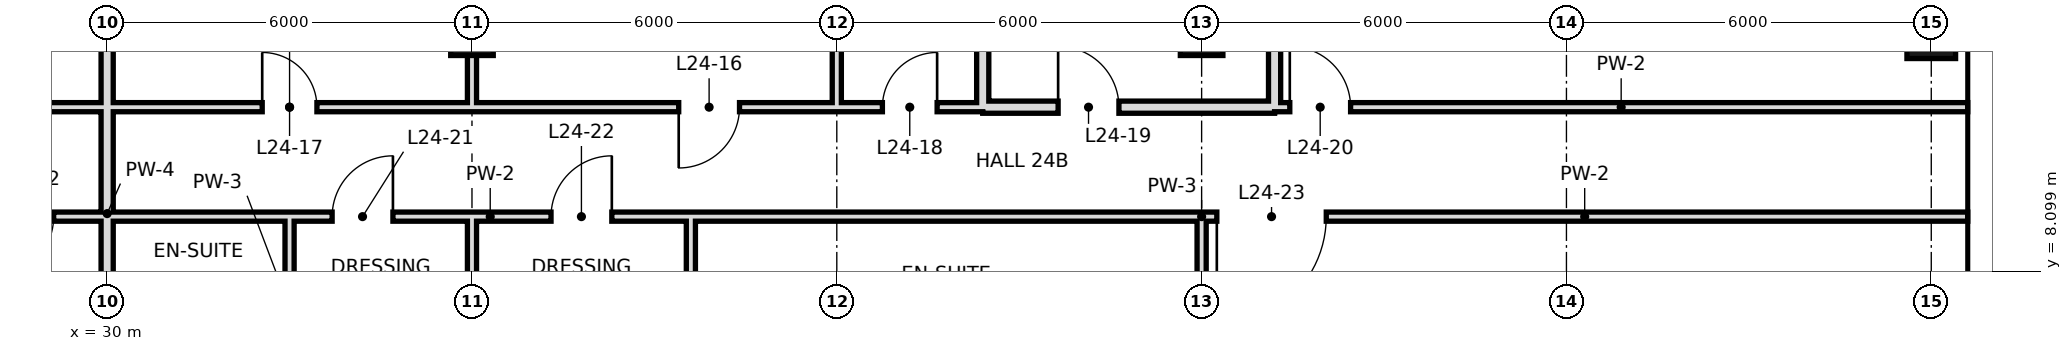
"""IFC4 building model, lengths in metres.
Left out: names, types, materials, properties, quantities, classifications, styles, units other than length and angle.
Written with IfcOpenShell. Run it as: python <this file> out.ifc"""

import sys

from ifc_helpers import new_model, si_unit, direction, frame, frame_2d, origin, origin_2d, place, context, subcontext, project, spatial, rectangle, hollow_rectangle, extrude, element, fill, save


model = new_model("IFC4")
c1 = context("Model", 3, precision=1e-05, world=origin(), true_north=direction((0.0, 1.0)))
c2 = subcontext(c1, "Body", "Model", "MODEL_VIEW")
j1 = project(units=[si_unit("LENGTHUNIT", "METRE"), si_unit("PLANEANGLEUNIT", "RADIAN")], contexts=[c1])
p1 = place(None, origin())
s1 = spatial("IfcSite", under=j1, at=p1, CompositionType="ELEMENT")
p2 = place(p1, origin())
s2 = spatial("IfcBuilding", under=s1, at=p2, CompositionType="ELEMENT")
p3 = place(p2, frame((0.0, 0.0, 110.6)))
s3 = spatial("IfcBuildingStorey", under=s2, at=p3, CompositionType="ELEMENT", Elevation=110.6)
for number, where, z_axis, x_axis in (
    (1, (36.0, 12.0, 0.0), (0.0, 0.0, 1.0), (1.0, 0.0, 0.0)),
    (2, (48.0, 12.0, 0.0), (0.0, 0.0, 1.0), (1.0, 0.0, 0.0)),
):
    element("IfcColumn", number, at=place(p3, frame(where, z_axis=z_axis, x_axis=x_axis)), inside=s3, PredefinedType="COLUMN", context=c2, shape_type="SweptSolid", body=[
        extrude(hollow_rectangle(XDim=0.7, YDim=0.7, WallThickness=0.036, at=origin_2d()), origin(), (0.0, 0.0, 1.0), 3.6),
    ])
p4 = place(p3, frame((60.0, 12.0, 0.0), z_axis=(0.0, 0.0, 1.0), x_axis=(1.0, 0.0, 0.0)))
e3 = element("IfcColumn", 3, at=p4, inside=s3, PredefinedType="COLUMN", context=c2, shape_type="SweptSolid", body=[
    extrude(hollow_rectangle(XDim=0.8, YDim=0.8, WallThickness=0.04, at=origin_2d()), origin(), (0.0, 0.0, 1.0), 3.6),
])
p5 = place(p3, frame((30.0, -0.6, 0.0), z_axis=(0.0, 0.0, 1.0), x_axis=(0.0, 1.0, 0.0)))
e4 = element("IfcWall", 4, at=p5, inside=s3, PredefinedType="SOLIDWALL", context=c2, shape_type="SweptSolid", body=[
    extrude(rectangle(XDim=19.3, YDim=0.2, at=frame_2d((9.65, 0.0))), origin(), (0.0, 0.0, 1.0), 2.68),
])
p6 = place(p3, frame((33.0, 6.0, 0.0), z_axis=(0.0, 0.0, 1.0), x_axis=(0.0, 1.0, 0.0)))
e5 = element("IfcWall", 5, at=p6, inside=s3, PredefinedType="PARTITIONING", context=c2, shape_type="SweptSolid", body=[
    extrude(rectangle(XDim=3.0, YDim=0.15, at=frame_2d((1.5, 0.0))), origin(), (0.0, 0.0, 1.0), 3.38),
])
p7 = place(p3, frame((36.0, 0.0, 0.0), z_axis=(0.0, 0.0, 1.0), x_axis=(0.0, 1.0, 0.0)))
e6 = element("IfcWall", 6, at=p7, inside=s3, PredefinedType="PARTITIONING", context=c2, shape_type="SweptSolid", body=[
    extrude(rectangle(XDim=9.0, YDim=0.15, at=frame_2d((4.5, 0.0))), origin(), (0.0, 0.0, 1.0), 2.68),
])
p8 = place(p3, frame((36.0, 10.8, 0.0), z_axis=(0.0, 0.0, 1.0), x_axis=(0.0, 1.0, 0.0)))
e7 = element("IfcWall", 7, at=p8, inside=s3, PredefinedType="PARTITIONING", context=c2, shape_type="SweptSolid", body=[
    extrude(rectangle(XDim=7.9, YDim=0.15, at=frame_2d((3.95, 0.0))), origin(), (0.0, 0.0, 1.0), 2.68),
])
p9 = place(p3, frame((39.6, 6.0, 0.0), z_axis=(0.0, 0.0, 1.0), x_axis=(0.0, 1.0, 0.0)))
e8 = element("IfcWall", 8, at=p9, inside=s3, PredefinedType="PARTITIONING", context=c2, shape_type="SweptSolid", body=[
    extrude(rectangle(XDim=3.0, YDim=0.15, at=frame_2d((1.5, 0.0))), origin(), (0.0, 0.0, 1.0), 3.38),
])
p10 = place(p3, frame((42.0, 10.8, 0.0), z_axis=(0.0, 0.0, 1.0), x_axis=(0.0, 1.0, 0.0)))
e9 = element("IfcWall", 9, at=p10, inside=s3, PredefinedType="PARTITIONING", context=c2, shape_type="SweptSolid", body=[
    extrude(rectangle(XDim=7.9, YDim=0.15, at=frame_2d((3.95, 0.0))), origin(), (0.0, 0.0, 1.0), 2.68),
])
p11 = place(p3, frame((44.4, 10.8, 0.0), z_axis=(0.0, 0.0, 1.0), x_axis=(0.0, 1.0, 0.0)))
e10 = element("IfcWall", 10, at=p11, inside=s3, PredefinedType="SOLIDWALL", context=c2, shape_type="SweptSolid", body=[
    extrude(rectangle(XDim=7.9, YDim=0.2, at=frame_2d((3.95, 0.0))), origin(), (0.0, 0.0, 1.0), 2.68),
])
p12 = place(p3, frame((48.0, 6.0, 0.0), z_axis=(0.0, 0.0, 1.0), x_axis=(0.0, 1.0, 0.0)))
e11 = element("IfcWall", 11, at=p12, inside=s3, PredefinedType="PARTITIONING", context=c2, shape_type="SweptSolid", body=[
    extrude(rectangle(XDim=3.0, YDim=0.15, at=frame_2d((1.5, 0.0))), origin(), (0.0, 0.0, 1.0), 2.68),
])
p13 = place(p3, frame((49.2, 10.8, 0.0), z_axis=(0.0, 0.0, 1.0), x_axis=(0.0, 1.0, 0.0)))
e12 = element("IfcWall", 12, at=p13, inside=s3, PredefinedType="SOLIDWALL", context=c2, shape_type="SweptSolid", body=[
    extrude(rectangle(XDim=7.2, YDim=0.2, at=frame_2d((3.6, 0.0))), origin(), (0.0, 0.0, 1.0), 2.68),
])
p14 = place(p3, frame((44.4, 10.8, 0.0), z_axis=(0.0, 0.0, 1.0), x_axis=(1.0, 0.0, 0.0)))
e13 = element("IfcWall", 13, at=p14, inside=s3, PredefinedType="SOLIDWALL", context=c2, shape_type="SweptSolid", body=[
    extrude(rectangle(XDim=4.8, YDim=0.2, at=frame_2d((2.4, 0.0))), origin(), (0.0, 0.0, 1.0), 2.68),
])
p15 = place(p14, frame((1.24, 0.0, 0.0)))
e14 = element("IfcOpeningElement", 14, at=p15, cuts=e13, PredefinedType="OPENING", context=c2, shape_type="SweptSolid", body=[
    extrude(rectangle(XDim=1.0, YDim=2.4, at=frame_2d((0.5, 1.2))), frame((0.0, 0.11, 0.0), z_axis=(0.0, -1.0, 0.0), x_axis=(1.0, 0.0, 0.0)), (0.0, 0.0, 1.0), 0.22),
])
p16 = place(p3, frame((24.0, 10.8, 0.0), z_axis=(0.0, 0.0, 1.0), x_axis=(1.0, 0.0, 0.0)))
e15 = element("IfcWall", 15, at=p16, inside=s3, PredefinedType="PARTITIONING", context=c2, shape_type="SweptSolid", body=[
    extrude(rectangle(XDim=18.0, YDim=0.15, at=frame_2d((9.0, 0.0))), origin(), (0.0, 0.0, 1.0), 3.38),
])
p17 = place(p16, frame((2.5, 0.0, 0.0)))
e16 = element("IfcOpeningElement", 16, at=p17, cuts=e15, PredefinedType="OPENING", context=c2, shape_type="SweptSolid", body=[
    extrude(rectangle(XDim=1.0, YDim=2.4, at=frame_2d((0.5, 1.2))), frame((0.0, 0.085, 0.0), z_axis=(0.0, -1.0, 0.0), x_axis=(1.0, 0.0, 0.0)), (0.0, 0.0, 1.0), 0.17),
])
p18 = place(p16, frame((15.4, 0.0, 0.0)))
e17 = element("IfcOpeningElement", 17, at=p18, cuts=e15, PredefinedType="OPENING", context=c2, shape_type="SweptSolid", body=[
    extrude(rectangle(XDim=1.0, YDim=2.4, at=frame_2d((0.5, 1.2))), frame((0.0, 0.085, 0.0), z_axis=(0.0, -1.0, 0.0), x_axis=(1.0, 0.0, 0.0)), (0.0, 0.0, 1.0), 0.17),
])
p19 = place(p16, frame((8.55, 0.0, 0.0)))
e18 = element("IfcOpeningElement", 18, at=p19, cuts=e15, PredefinedType="OPENING", context=c2, shape_type="SweptSolid", body=[
    extrude(rectangle(XDim=0.9, YDim=2.1, at=frame_2d((0.45, 1.05))), frame((0.0, 0.085, 0.0), z_axis=(0.0, -1.0, 0.0), x_axis=(1.0, 0.0, 0.0)), (0.0, 0.0, 1.0), 0.17),
])
p20 = place(p3, frame((49.2, 10.8, 0.0), z_axis=(0.0, 0.0, 1.0), x_axis=(1.0, 0.0, 0.0)))
e19 = element("IfcWall", 19, at=p20, inside=s3, PredefinedType="PARTITIONING", context=c2, shape_type="SweptSolid", body=[
    extrude(rectangle(XDim=11.4, YDim=0.15, at=frame_2d((5.7, 0.0))), origin(), (0.0, 0.0, 1.0), 3.38),
])
p21 = place(p20, frame((0.25, 0.0, 0.0)))
e20 = element("IfcOpeningElement", 20, at=p21, cuts=e19, PredefinedType="OPENING", context=c2, shape_type="SweptSolid", body=[
    extrude(rectangle(XDim=1.0, YDim=2.4, at=frame_2d((0.5, 1.2))), frame((0.0, 0.085, 0.0), z_axis=(0.0, -1.0, 0.0), x_axis=(1.0, 0.0, 0.0)), (0.0, 0.0, 1.0), 0.17),
])
p22 = place(p3, frame((42.0, 10.8, 0.0), z_axis=(0.0, 0.0, 1.0), x_axis=(1.0, 0.0, 0.0)))
e21 = element("IfcWall", 21, at=p22, inside=s3, PredefinedType="PARTITIONING", context=c2, shape_type="SweptSolid", body=[
    extrude(rectangle(XDim=2.4, YDim=0.15, at=frame_2d((1.2, 0.0))), origin(), (0.0, 0.0, 1.0), 3.38),
])
p23 = place(p22, frame((0.75, 0.0, 0.0)))
e22 = element("IfcOpeningElement", 22, at=p23, cuts=e21, PredefinedType="OPENING", context=c2, shape_type="SweptSolid", body=[
    extrude(rectangle(XDim=0.9, YDim=2.4, at=frame_2d((0.45, 1.2))), frame((0.0, 0.085, 0.0), z_axis=(0.0, -1.0, 0.0), x_axis=(1.0, 0.0, 0.0)), (0.0, 0.0, 1.0), 0.17),
])
p24 = place(p3, frame((26.4, 9.0, 0.0), z_axis=(0.0, 0.0, 1.0), x_axis=(1.0, 0.0, 0.0)))
e23 = element("IfcWall", 23, at=p24, inside=s3, PredefinedType="PARTITIONING", context=c2, shape_type="SweptSolid", body=[
    extrude(rectangle(XDim=3.6, YDim=0.15, at=frame_2d((1.8, 0.0))), origin(), (0.0, 0.0, 1.0), 3.38),
])
p25 = place(p24, frame((1.72, 0.0, 0.0)))
e24 = element("IfcOpeningElement", 24, at=p25, cuts=e23, PredefinedType="OPENING", context=c2, shape_type="SweptSolid", body=[
    extrude(rectangle(XDim=1.0, YDim=2.4, at=frame_2d((0.5, 1.2))), frame((0.0, 0.085, 0.0), z_axis=(0.0, -1.0, 0.0), x_axis=(1.0, 0.0, 0.0)), (0.0, 0.0, 1.0), 0.17),
])
p26 = place(p3, frame((33.0, 9.0, 0.0), z_axis=(0.0, 0.0, 1.0), x_axis=(1.0, 0.0, 0.0)))
e25 = element("IfcWall", 25, at=p26, inside=s3, PredefinedType="PARTITIONING", context=c2, shape_type="SweptSolid", body=[
    extrude(rectangle(XDim=6.6, YDim=0.15, at=frame_2d((3.3, 0.0))), origin(), (0.0, 0.0, 1.0), 3.38),
])
p27 = place(p26, frame((0.7, 0.0, 0.0)))
e26 = element("IfcOpeningElement", 26, at=p27, cuts=e25, PredefinedType="OPENING", context=c2, shape_type="SweptSolid", body=[
    extrude(rectangle(XDim=1.0, YDim=2.4, at=frame_2d((0.5, 1.2))), frame((0.0, 0.085, 0.0), z_axis=(0.0, -1.0, 0.0), x_axis=(1.0, 0.0, 0.0)), (0.0, 0.0, 1.0), 0.17),
])
p28 = place(p26, frame((4.3, 0.0, 0.0)))
e27 = element("IfcOpeningElement", 27, at=p28, cuts=e25, PredefinedType="OPENING", context=c2, shape_type="SweptSolid", body=[
    extrude(rectangle(XDim=1.0, YDim=2.4, at=frame_2d((0.5, 1.2))), frame((0.0, 0.085, 0.0), z_axis=(0.0, -1.0, 0.0), x_axis=(1.0, 0.0, 0.0)), (0.0, 0.0, 1.0), 0.17),
])
p29 = place(p3, frame((48.0, 9.0, 0.0), z_axis=(0.0, 0.0, 1.0), x_axis=(1.0, 0.0, 0.0)))
e28 = element("IfcWall", 28, at=p29, inside=s3, PredefinedType="PARTITIONING", context=c2, shape_type="SweptSolid", body=[
    extrude(rectangle(XDim=12.6, YDim=0.15, at=frame_2d((6.3, 0.0))), origin(), (0.0, 0.0, 1.0), 3.38),
])
p30 = place(p29, frame((0.25, 0.0, 0.0)))
e29 = element("IfcOpeningElement", 29, at=p30, cuts=e28, PredefinedType="OPENING", context=c2, shape_type="SweptSolid", body=[
    extrude(rectangle(XDim=1.8, YDim=2.4, at=frame_2d((0.9, 1.2))), frame((0.0, 0.085, 0.0), z_axis=(0.0, -1.0, 0.0), x_axis=(1.0, 0.0, 0.0)), (0.0, 0.0, 1.0), 0.17),
])
p31 = place(p3, frame((30.0, 9.0, 0.0), z_axis=(0.0, 0.0, 1.0), x_axis=(1.0, 0.0, 0.0)))
e30 = element("IfcWall", 30, at=p31, inside=s3, PredefinedType="PARTITIONING", context=c2, shape_type="SweptSolid", body=[
    extrude(rectangle(XDim=3.0, YDim=0.15, at=frame_2d((1.5, 0.0))), origin(), (0.0, 0.0, 1.0), 3.38),
])
p32 = place(p3, frame((39.6, 9.0, 0.0), z_axis=(0.0, 0.0, 1.0), x_axis=(1.0, 0.0, 0.0)))
e31 = element("IfcWall", 31, at=p32, inside=s3, PredefinedType="PARTITIONING", context=c2, shape_type="SweptSolid", body=[
    extrude(rectangle(XDim=8.4, YDim=0.15, at=frame_2d((4.2, 0.0))), origin(), (0.0, 0.0, 1.0), 3.38),
])
p33 = place(p25, frame((1.0, 0.0, 0.0), z_axis=(0.0, 0.0, 1.0), x_axis=(-1.0, 0.0, 0.0)))
e32 = element("IfcDoor", 32, at=p33, inside=s3, OperationType="SINGLE_SWING_RIGHT", PredefinedType="DOOR", context=c2, shape_type="SweptSolid", body=[
    extrude(rectangle(XDim=1.0, YDim=2.4, at=frame_2d((0.5, 1.2))), frame((0.0, 0.025, 0.0), z_axis=(0.0, -1.0, 0.0), x_axis=(1.0, 0.0, 0.0)), (0.0, 0.0, 1.0), 0.05),
])
fill(e24, e32)
p34 = place(p18, frame((1.0, 0.0, 0.0), z_axis=(0.0, 0.0, 1.0), x_axis=(-1.0, 0.0, 0.0)))
e33 = element("IfcDoor", 33, at=p34, inside=s3, OperationType="SINGLE_SWING_RIGHT", PredefinedType="DOOR", context=c2, shape_type="SweptSolid", body=[
    extrude(rectangle(XDim=1.0, YDim=2.4, at=frame_2d((0.5, 1.2))), frame((0.0, 0.025, 0.0), z_axis=(0.0, -1.0, 0.0), x_axis=(1.0, 0.0, 0.0)), (0.0, 0.0, 1.0), 0.05),
])
fill(e17, e33)
p35 = place(p19, origin())
e34 = element("IfcDoor", 34, at=p35, inside=s3, OperationType="SINGLE_SWING_LEFT", PredefinedType="DOOR", context=c2, shape_type="SweptSolid", body=[
    extrude(rectangle(XDim=0.9, YDim=2.1, at=frame_2d((0.45, 1.05))), frame((0.0, 0.025, 0.0), z_axis=(0.0, -1.0, 0.0), x_axis=(1.0, 0.0, 0.0)), (0.0, 0.0, 1.0), 0.05),
])
fill(e18, e34)
p36 = place(p23, frame((0.9, 0.0, 0.0), z_axis=(0.0, 0.0, 1.0), x_axis=(-1.0, 0.0, 0.0)))
e35 = element("IfcDoor", 35, at=p36, inside=s3, OperationType="SINGLE_SWING_LEFT", PredefinedType="DOOR", context=c2, shape_type="SweptSolid", body=[
    extrude(rectangle(XDim=0.9, YDim=2.4, at=frame_2d((0.45, 1.2))), frame((0.0, 0.025, 0.0), z_axis=(0.0, -1.0, 0.0), x_axis=(1.0, 0.0, 0.0)), (0.0, 0.0, 1.0), 0.05),
])
fill(e22, e35)
p37 = place(p15, origin())
e36 = element("IfcDoor", 36, at=p37, inside=s3, OperationType="SINGLE_SWING_LEFT", PredefinedType="DOOR", context=c2, shape_type="SweptSolid", body=[
    extrude(rectangle(XDim=1.0, YDim=2.4, at=frame_2d((0.5, 1.2))), frame((0.0, 0.025, 0.0), z_axis=(0.0, -1.0, 0.0), x_axis=(1.0, 0.0, 0.0)), (0.0, 0.0, 1.0), 0.05),
])
fill(e14, e36)
p38 = place(p21, origin())
e37 = element("IfcDoor", 37, at=p38, inside=s3, OperationType="SINGLE_SWING_LEFT", PredefinedType="DOOR", context=c2, shape_type="SweptSolid", body=[
    extrude(rectangle(XDim=1.0, YDim=2.4, at=frame_2d((0.5, 1.2))), frame((0.0, 0.025, 0.0), z_axis=(0.0, -1.0, 0.0), x_axis=(1.0, 0.0, 0.0)), (0.0, 0.0, 1.0), 0.05),
])
fill(e20, e37)
p39 = place(p27, frame((1.0, 0.0, 0.0), z_axis=(0.0, 0.0, 1.0), x_axis=(-1.0, 0.0, 0.0)))
e38 = element("IfcDoor", 38, at=p39, inside=s3, OperationType="SINGLE_SWING_LEFT", PredefinedType="DOOR", context=c2, shape_type="SweptSolid", body=[
    extrude(rectangle(XDim=1.0, YDim=2.4, at=frame_2d((0.5, 1.2))), frame((0.0, 0.025, 0.0), z_axis=(0.0, -1.0, 0.0), x_axis=(1.0, 0.0, 0.0)), (0.0, 0.0, 1.0), 0.05),
])
fill(e26, e38)
p40 = place(p28, frame((1.0, 0.0, 0.0), z_axis=(0.0, 0.0, 1.0), x_axis=(-1.0, 0.0, 0.0)))
e39 = element("IfcDoor", 39, at=p40, inside=s3, OperationType="SINGLE_SWING_LEFT", PredefinedType="DOOR", context=c2, shape_type="SweptSolid", body=[
    extrude(rectangle(XDim=1.0, YDim=2.4, at=frame_2d((0.5, 1.2))), frame((0.0, 0.025, 0.0), z_axis=(0.0, -1.0, 0.0), x_axis=(1.0, 0.0, 0.0)), (0.0, 0.0, 1.0), 0.05),
])
fill(e27, e39)
p41 = place(p30, frame((1.8, 0.0, 0.0), z_axis=(0.0, 0.0, 1.0), x_axis=(-1.0, 0.0, 0.0)))
e40 = element("IfcDoor", 40, at=p41, inside=s3, OperationType="SINGLE_SWING_RIGHT", PredefinedType="DOOR", context=c2, shape_type="SweptSolid", body=[
    extrude(rectangle(XDim=1.8, YDim=2.4, at=frame_2d((0.9, 1.2))), frame((0.0, 0.025, 0.0), z_axis=(0.0, -1.0, 0.0), x_axis=(1.0, 0.0, 0.0)), (0.0, 0.0, 1.0), 0.05),
])
fill(e29, e40)
save(model, sys.argv[1])
